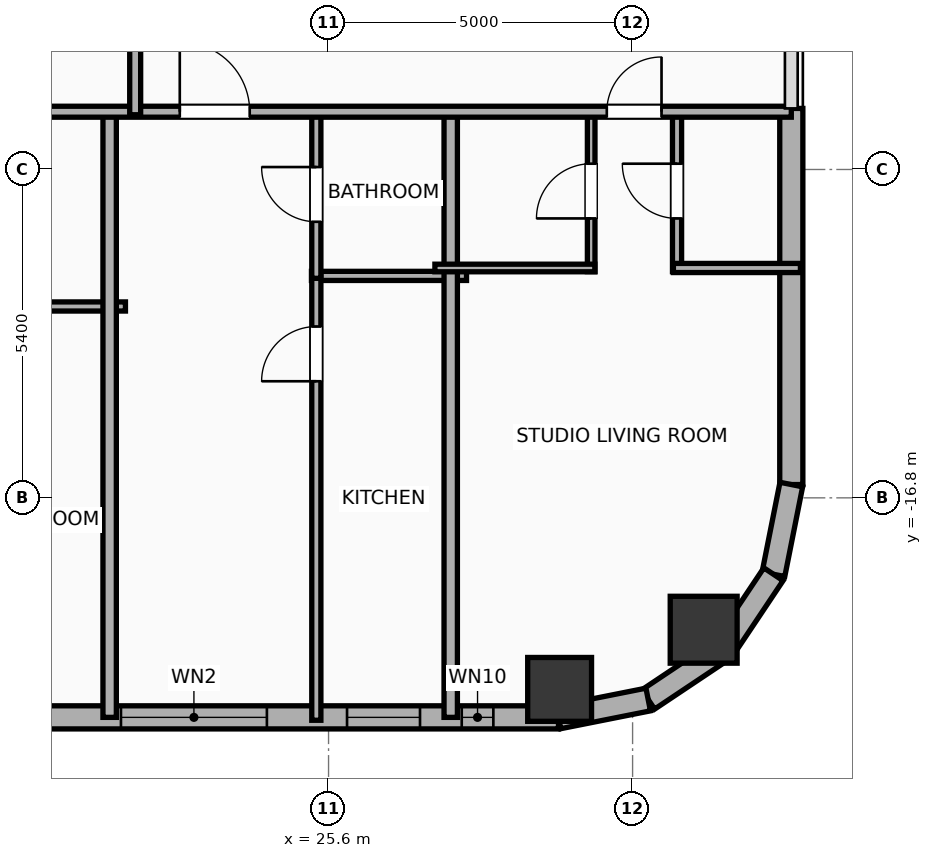
"""IFC4 building model, lengths in metres.
Left out: names, types, materials, properties, quantities, classifications, styles, units other than length and angle.
Written with IfcOpenShell. Run it as: python <this file> out.ifc"""

import sys

from ifc_helpers import new_model, si_unit, direction, frame, frame_2d, origin, origin_2d, place, context, subcontext, project, spatial, rectangle, hollow_rectangle, hollow_circle, extrude, element, fill, save


model = new_model("IFC4")
c1 = context("Model", 3, precision=1e-05, world=origin(), true_north=direction((0.0, 1.0)))
c2 = subcontext(c1, "Body", "Model", "MODEL_VIEW")
j1 = project(units=[si_unit("LENGTHUNIT", "METRE"), si_unit("PLANEANGLEUNIT", "RADIAN")], contexts=[c1])
p1 = place(None, origin())
s1 = spatial("IfcSite", under=j1, at=p1, CompositionType="ELEMENT")
p2 = place(p1, origin())
s2 = spatial("IfcBuilding", under=s1, at=p2, CompositionType="ELEMENT")
p3 = place(p2, frame((0.0, 0.0, 93.6)))
s3 = spatial("IfcBuildingStorey", under=s2, at=p3, CompositionType="ELEMENT", Elevation=93.6)
p4 = place(p3, frame((29.4, -19.95, 0.0), z_axis=(0.0, 0.0, 1.0), x_axis=(1.0, 0.0, 0.0)))
e1 = element("IfcColumn", 1, at=p4, inside=s3, PredefinedType="COLUMN", context=c2, shape_type="SweptSolid", body=[
    extrude(hollow_rectangle(XDim=1.05, YDim=1.05, WallThickness=0.036, at=origin_2d()), origin(), (0.0, 0.0, 1.0), 3.9),
])
p5 = place(p3, frame((31.769, -18.969, 0.0), z_axis=(0.0, 0.0, 1.0), x_axis=(1.0, 0.0, 0.0)))
e2 = element("IfcColumn", 2, at=p5, inside=s3, PredefinedType="COLUMN", context=c2, shape_type="SweptSolid", body=[
    extrude(hollow_circle(Radius=0.55, WallThickness=0.036, at=origin_2d()), origin(), (0.0, 0.0, 1.0), 3.9),
])
p6 = place(p3, frame((29.381, -20.41, 0.0), z_axis=(0.0, 0.0, 1.0), x_axis=(-1.0, 0.0, 0.0)))
e3 = element("IfcWall", 3, at=p6, inside=s3, PredefinedType="ELEMENTEDWALL", context=c2, shape_type="SweptSolid", body=[
    extrude(rectangle(XDim=54.763, YDim=0.38, at=frame_2d((27.381, 0.0))), origin(), (0.0, 0.0, 1.0), 3.65),
])
p7 = place(p6, frame((4.795, 0.0, 0.75)))
e4 = element("IfcOpeningElement", 4, at=p7, cuts=e3, PredefinedType="OPENING", context=c2, shape_type="SweptSolid", body=[
    extrude(rectangle(XDim=2.4, YDim=2.1, at=frame_2d((1.2, 1.05))), frame((0.0, 0.2, 0.0), z_axis=(0.0, -1.0, 0.0), x_axis=(1.0, 0.0, 0.0)), (0.0, 0.0, 1.0), 0.4),
])
p8 = place(p6, frame((33.877, 0.0, 0.75)))
e5 = element("IfcOpeningElement", 5, at=p8, cuts=e3, PredefinedType="OPENING", context=c2, shape_type="SweptSolid", body=[
    extrude(rectangle(XDim=2.4, YDim=2.1, at=frame_2d((1.2, 1.05))), frame((0.0, 0.2, 0.0), z_axis=(0.0, -1.0, 0.0), x_axis=(1.0, 0.0, 0.0)), (0.0, 0.0, 1.0), 0.4),
])
p9 = place(p6, frame((45.867, 0.0, 0.75)))
e6 = element("IfcOpeningElement", 6, at=p9, cuts=e3, PredefinedType="OPENING", context=c2, shape_type="SweptSolid", body=[
    extrude(rectangle(XDim=2.4, YDim=2.1, at=frame_2d((1.2, 1.05))), frame((0.0, 0.2, 0.0), z_axis=(0.0, -1.0, 0.0), x_axis=(1.0, 0.0, 0.0)), (0.0, 0.0, 1.0), 0.4),
])
p10 = place(p6, frame((53.122, 0.0, 0.75)))
e7 = element("IfcOpeningElement", 7, at=p10, cuts=e3, PredefinedType="OPENING", context=c2, shape_type="SweptSolid", body=[
    extrude(rectangle(XDim=0.85, YDim=2.05, at=frame_2d((0.425, 1.025))), frame((0.0, 0.2, 0.0), z_axis=(0.0, -1.0, 0.0), x_axis=(1.0, 0.0, 0.0)), (0.0, 0.0, 1.0), 0.4),
])
p11 = place(p6, frame((50.286, 0.0, 0.75)))
e8 = element("IfcOpeningElement", 8, at=p11, cuts=e3, PredefinedType="OPENING", context=c2, shape_type="SweptSolid", body=[
    extrude(rectangle(XDim=1.2, YDim=2.05, at=frame_2d((0.6, 1.025))), frame((0.0, 0.2, 0.0), z_axis=(0.0, -1.0, 0.0), x_axis=(1.0, 0.0, 0.0)), (0.0, 0.0, 1.0), 0.4),
])
p12 = place(p6, frame((41.846, 0.0, 0.75)))
e9 = element("IfcOpeningElement", 9, at=p12, cuts=e3, PredefinedType="OPENING", context=c2, shape_type="SweptSolid", body=[
    extrude(rectangle(XDim=1.2, YDim=2.05, at=frame_2d((0.6, 1.025))), frame((0.0, 0.2, 0.0), z_axis=(0.0, -1.0, 0.0), x_axis=(1.0, 0.0, 0.0)), (0.0, 0.0, 1.0), 0.4),
])
p13 = place(p6, frame((38.886, 0.0, 0.75)))
e10 = element("IfcOpeningElement", 10, at=p13, cuts=e3, PredefinedType="OPENING", context=c2, shape_type="SweptSolid", body=[
    extrude(rectangle(XDim=1.2, YDim=2.05, at=frame_2d((0.6, 1.025))), frame((0.0, 0.2, 0.0), z_axis=(0.0, -1.0, 0.0), x_axis=(1.0, 0.0, 0.0)), (0.0, 0.0, 1.0), 0.4),
])
p14 = place(p6, frame((30.926, 0.0, 0.75)))
e11 = element("IfcOpeningElement", 11, at=p14, cuts=e3, PredefinedType="OPENING", context=c2, shape_type="SweptSolid", body=[
    extrude(rectangle(XDim=1.2, YDim=2.05, at=frame_2d((0.6, 1.025))), frame((0.0, 0.2, 0.0), z_axis=(0.0, -1.0, 0.0), x_axis=(1.0, 0.0, 0.0)), (0.0, 0.0, 1.0), 0.4),
])
p15 = place(p6, frame((27.486, 0.0, 0.75)))
e12 = element("IfcOpeningElement", 12, at=p15, cuts=e3, PredefinedType="OPENING", context=c2, shape_type="SweptSolid", body=[
    extrude(rectangle(XDim=1.2, YDim=2.05, at=frame_2d((0.6, 1.025))), frame((0.0, 0.2, 0.0), z_axis=(0.0, -1.0, 0.0), x_axis=(1.0, 0.0, 0.0)), (0.0, 0.0, 1.0), 0.4),
])
p16 = place(p6, frame((23.686, 0.0, 0.75)))
e13 = element("IfcOpeningElement", 13, at=p16, cuts=e3, PredefinedType="OPENING", context=c2, shape_type="SweptSolid", body=[
    extrude(rectangle(XDim=1.2, YDim=2.05, at=frame_2d((0.6, 1.025))), frame((0.0, 0.2, 0.0), z_axis=(0.0, -1.0, 0.0), x_axis=(1.0, 0.0, 0.0)), (0.0, 0.0, 1.0), 0.4),
])
p17 = place(p6, frame((19.886, 0.0, 0.75)))
e14 = element("IfcOpeningElement", 14, at=p17, cuts=e3, PredefinedType="OPENING", context=c2, shape_type="SweptSolid", body=[
    extrude(rectangle(XDim=1.2, YDim=2.05, at=frame_2d((0.6, 1.025))), frame((0.0, 0.2, 0.0), z_axis=(0.0, -1.0, 0.0), x_axis=(1.0, 0.0, 0.0)), (0.0, 0.0, 1.0), 0.4),
])
p18 = place(p6, frame((16.086, 0.0, 0.75)))
e15 = element("IfcOpeningElement", 15, at=p18, cuts=e3, PredefinedType="OPENING", context=c2, shape_type="SweptSolid", body=[
    extrude(rectangle(XDim=1.2, YDim=2.05, at=frame_2d((0.6, 1.025))), frame((0.0, 0.2, 0.0), z_axis=(0.0, -1.0, 0.0), x_axis=(1.0, 0.0, 0.0)), (0.0, 0.0, 1.0), 0.4),
])
p19 = place(p6, frame((12.286, 0.0, 0.75)))
e16 = element("IfcOpeningElement", 16, at=p19, cuts=e3, PredefinedType="OPENING", context=c2, shape_type="SweptSolid", body=[
    extrude(rectangle(XDim=1.2, YDim=2.05, at=frame_2d((0.6, 1.025))), frame((0.0, 0.2, 0.0), z_axis=(0.0, -1.0, 0.0), x_axis=(1.0, 0.0, 0.0)), (0.0, 0.0, 1.0), 0.4),
])
p20 = place(p6, frame((8.486, 0.0, 0.75)))
e17 = element("IfcOpeningElement", 17, at=p20, cuts=e3, PredefinedType="OPENING", context=c2, shape_type="SweptSolid", body=[
    extrude(rectangle(XDim=1.2, YDim=2.05, at=frame_2d((0.6, 1.025))), frame((0.0, 0.2, 0.0), z_axis=(0.0, -1.0, 0.0), x_axis=(1.0, 0.0, 0.0)), (0.0, 0.0, 1.0), 0.4),
])
p21 = place(p6, frame((2.277, 0.0, 0.75)))
e18 = element("IfcOpeningElement", 18, at=p21, cuts=e3, PredefinedType="OPENING", context=c2, shape_type="SweptSolid", body=[
    extrude(rectangle(XDim=1.2, YDim=2.05, at=frame_2d((0.6, 1.025))), frame((0.0, 0.2, 0.0), z_axis=(0.0, -1.0, 0.0), x_axis=(1.0, 0.0, 0.0)), (0.0, 0.0, 1.0), 0.4),
])
p22 = place(p6, frame((1.071, 0.0, 0.75)))
e19 = element("IfcOpeningElement", 19, at=p22, cuts=e3, PredefinedType="OPENING", context=c2, shape_type="SweptSolid", body=[
    extrude(rectangle(XDim=0.52, YDim=2.05, at=frame_2d((0.26, 1.025))), frame((0.0, 0.2, 0.0), z_axis=(0.0, -1.0, 0.0), x_axis=(1.0, 0.0, 0.0)), (0.0, 0.0, 1.0), 0.4),
])
p23 = place(p3, frame((33.21, -10.396, 0.0), z_axis=(0.0, 0.0, 1.0), x_axis=(0.0, -1.0, 0.0)))
e20 = element("IfcWall", 20, at=p23, inside=s3, PredefinedType="ELEMENTEDWALL", context=c2, shape_type="SweptSolid", body=[
    extrude(rectangle(XDim=6.185, YDim=0.38, at=frame_2d((3.093, 0.0))), origin(), (0.0, 0.0, 1.0), 3.65),
])
p24 = place(p3, frame((33.21, -16.581, 0.0), z_axis=(0.0, 0.0, 1.0), x_axis=(-0.195086038585, -0.980786132421, 0.0)))
e21 = element("IfcWall", 21, at=p24, inside=s3, PredefinedType="ELEMENTEDWALL", context=c2, shape_type="SweptSolid", body=[
    extrude(rectangle(XDim=1.504, YDim=0.38, at=frame_2d((0.752, 0.0))), origin(), (0.0, 0.0, 1.0), 3.65),
])
p25 = place(p3, frame((32.917, -18.057, 0.0), z_axis=(0.0, 0.0, 1.0), x_axis=(-0.555610286119, -0.831442848281, 0.0)))
e22 = element("IfcWall", 22, at=p25, inside=s3, PredefinedType="ELEMENTEDWALL", context=c2, shape_type="SweptSolid", body=[
    extrude(rectangle(XDim=1.485, YDim=0.38, at=frame_2d((0.743, 0.0))), origin(), (0.0, 0.0, 1.0), 3.65),
])
p26 = place(p3, frame((32.091, -19.292, 0.0), z_axis=(0.0, 0.0, 1.0), x_axis=(-0.831468045563, -0.555572577804, 0.0)))
e23 = element("IfcWall", 23, at=p26, inside=s3, PredefinedType="ELEMENTEDWALL", context=c2, shape_type="SweptSolid", body=[
    extrude(rectangle(XDim=1.485, YDim=0.38, at=frame_2d((0.742, 0.0))), origin(), (0.0, 0.0, 1.0), 3.65),
])
p27 = place(p3, frame((30.857, -20.116, 0.0), z_axis=(0.0, 0.0, 1.0), x_axis=(-0.980786132421, -0.195086038585, 0.0)))
e24 = element("IfcWall", 24, at=p27, inside=s3, PredefinedType="ELEMENTEDWALL", context=c2, shape_type="SweptSolid", body=[
    extrude(rectangle(XDim=1.504, YDim=0.38, at=frame_2d((0.752, 0.0))), origin(), (0.0, 0.0, 1.0), 3.65),
])
p28 = place(p3, frame((18.47, -13.653, 0.0), z_axis=(0.0, 0.0, 1.0), x_axis=(1.0, 0.0, 0.0)))
e25 = element("IfcWall", 25, at=p28, inside=s3, PredefinedType="PLUMBINGWALL", context=c2, shape_type="SweptSolid", body=[
    extrude(rectangle(XDim=3.79, YDim=0.15, at=frame_2d((1.895, 0.0))), origin(), (0.0, 0.0, 1.0), 3.65),
])
p29 = place(p3, frame((22.0, -20.41, 0.0), z_axis=(0.0, 0.0, 1.0), x_axis=(0.0, 1.0, 0.0)))
e26 = element("IfcWall", 26, at=p29, inside=s3, PredefinedType="PARTITIONING", context=c2, shape_type="SweptSolid", body=[
    extrude(rectangle(XDim=10.04, YDim=0.22, at=frame_2d((5.02, 0.0))), origin(), (0.0, 0.0, 1.0), 3.65),
])
p30 = place(p3, frame((25.319, -13.15, 0.0), z_axis=(0.0, 0.0, 1.0), x_axis=(1.0, 0.0, 0.0)))
e27 = element("IfcWall", 27, at=p30, inside=s3, PredefinedType="PLUMBINGWALL", context=c2, shape_type="SweptSolid", body=[
    extrude(rectangle(XDim=2.55, YDim=0.15, at=frame_2d((1.275, 0.0))), origin(), (0.0, 0.0, 1.0), 3.65),
])
p31 = place(p3, frame((25.399, -20.458, 0.0), z_axis=(0.0, 0.0, 1.0), x_axis=(0.0, 1.0, 0.0)))
e28 = element("IfcWall", 28, at=p31, inside=s3, PredefinedType="PLUMBINGWALL", context=c2, shape_type="SweptSolid", body=[
    extrude(rectangle(XDim=7.347, YDim=0.15, at=frame_2d((3.674, 0.0))), origin(), (0.0, 0.0, 1.0), 3.65),
])
p32 = place(p31, frame((5.575, 0.0, 0.0)))
e29 = element("IfcOpeningElement", 29, at=p32, cuts=e28, PredefinedType="OPENING", context=c2, shape_type="SweptSolid", body=[
    extrude(rectangle(XDim=0.9, YDim=2.05, at=frame_2d((0.45, 1.025))), frame((0.0, 0.085, 0.0), z_axis=(0.0, -1.0, 0.0), x_axis=(1.0, 0.0, 0.0)), (0.0, 0.0, 1.0), 0.17),
])
p33 = place(p3, frame((25.399, -13.19, 0.0), z_axis=(0.0, 0.0, 1.0), x_axis=(0.0, 1.0, 0.0)))
e30 = element("IfcWall", 30, at=p33, inside=s3, PredefinedType="PLUMBINGWALL", context=c2, shape_type="SweptSolid", body=[
    extrude(rectangle(XDim=2.76, YDim=0.15, at=frame_2d((1.38, 0.0))), origin(), (0.0, 0.0, 1.0), 3.65),
])
p34 = place(p33, frame((0.93, 0.0, 0.0)))
e31 = element("IfcOpeningElement", 31, at=p34, cuts=e30, PredefinedType="OPENING", context=c2, shape_type="SweptSolid", body=[
    extrude(rectangle(XDim=0.9, YDim=2.05, at=frame_2d((0.45, 1.025))), frame((0.0, 0.085, 0.0), z_axis=(0.0, -1.0, 0.0), x_axis=(1.0, 0.0, 0.0)), (0.0, 0.0, 1.0), 0.17),
])
p35 = place(p3, frame((27.609, -20.41, 0.0), z_axis=(0.0, 0.0, 1.0), x_axis=(0.0, 1.0, 0.0)))
e32 = element("IfcWall", 32, at=p35, inside=s3, PredefinedType="PARTITIONING", context=c2, shape_type="SweptSolid", body=[
    extrude(rectangle(XDim=10.04, YDim=0.22, at=frame_2d((5.02, 0.0))), origin(), (0.0, 0.0, 1.0), 3.65),
])
p36 = place(p3, frame((29.919, -13.08, 0.0), z_axis=(0.0, 0.0, 1.0), x_axis=(0.0, 1.0, 0.0)))
e33 = element("IfcWall", 33, at=p36, inside=s3, PredefinedType="PARTITIONING", context=c2, shape_type="SweptSolid", body=[
    extrude(rectangle(XDim=2.65, YDim=0.125, at=frame_2d((1.325, 0.0))), origin(), (0.0, 0.0, 1.0), 3.65),
])
p37 = place(p36, frame((0.875, 0.0, 0.0)))
e34 = element("IfcOpeningElement", 34, at=p37, cuts=e33, PredefinedType="OPENING", context=c2, shape_type="SweptSolid", body=[
    extrude(rectangle(XDim=0.9, YDim=2.05, at=frame_2d((0.45, 1.025))), frame((0.0, 0.073, 0.0), z_axis=(0.0, -1.0, 0.0), x_axis=(1.0, 0.0, 0.0)), (0.0, 0.0, 1.0), 0.145),
])
p38 = place(p3, frame((31.331, -13.08, 0.0), z_axis=(0.0, 0.0, 1.0), x_axis=(0.0, 1.0, 0.0)))
e35 = element("IfcWall", 35, at=p38, inside=s3, PredefinedType="PLUMBINGWALL", context=c2, shape_type="SweptSolid", body=[
    extrude(rectangle(XDim=2.65, YDim=0.15, at=frame_2d((1.325, 0.0))), origin(), (0.0, 0.0, 1.0), 3.65),
])
p39 = place(p38, frame((0.875, 0.0, 0.0)))
e36 = element("IfcOpeningElement", 36, at=p39, cuts=e35, PredefinedType="OPENING", context=c2, shape_type="SweptSolid", body=[
    extrude(rectangle(XDim=0.9, YDim=2.05, at=frame_2d((0.45, 1.025))), frame((0.0, 0.085, 0.0), z_axis=(0.0, -1.0, 0.0), x_axis=(1.0, 0.0, 0.0)), (0.0, 0.0, 1.0), 0.17),
])
p40 = place(p3, frame((27.349, -13.02, 0.0), z_axis=(0.0, 0.0, 1.0), x_axis=(1.0, 0.0, 0.0)))
e37 = element("IfcWall", 37, at=p40, inside=s3, PredefinedType="PARTITIONING", context=c2, shape_type="SweptSolid", body=[
    extrude(rectangle(XDim=2.63, YDim=0.125, at=frame_2d((1.315, 0.0))), origin(), (0.0, 0.0, 1.0), 3.65),
])
p41 = place(p3, frame((31.271, -13.02, 0.0), z_axis=(0.0, 0.0, 1.0), x_axis=(1.0, 0.0, 0.0)))
e38 = element("IfcWall", 38, at=p41, inside=s3, PredefinedType="PLUMBINGWALL", context=c2, shape_type="SweptSolid", body=[
    extrude(rectangle(XDim=2.089, YDim=0.15, at=frame_2d((1.044, 0.0))), origin(), (0.0, 0.0, 1.0), 3.65),
])
p42 = place(p3, frame((-29.21, -10.45, 0.0), z_axis=(0.0, 0.0, 1.0), x_axis=(1.0, 0.0, 0.0)))
e39 = element("IfcWall", 39, at=p42, inside=s3, PredefinedType="PARTITIONING", context=c2, shape_type="SweptSolid", body=[
    extrude(rectangle(XDim=62.42, YDim=0.18, at=frame_2d((31.21, 0.0))), origin(), (0.0, 0.0, 1.0), 3.65),
])
p43 = place(p42, frame((2.502, 0.0, 0.0)))
e40 = element("IfcOpeningElement", 40, at=p43, cuts=e39, PredefinedType="OPENING", context=c2, shape_type="SweptSolid", body=[
    extrude(rectangle(XDim=0.9, YDim=2.05, at=frame_2d((0.45, 1.025))), frame((0.0, 0.1, 0.0), z_axis=(0.0, -1.0, 0.0), x_axis=(1.0, 0.0, 0.0)), (0.0, 0.0, 1.0), 0.2),
])
p44 = place(p42, frame((9.0, 0.0, 0.0)))
e41 = element("IfcOpeningElement", 41, at=p44, cuts=e39, PredefinedType="OPENING", context=c2, shape_type="SweptSolid", body=[
    extrude(rectangle(XDim=1.15, YDim=2.05, at=frame_2d((0.575, 1.025))), frame((0.0, 0.1, 0.0), z_axis=(0.0, -1.0, 0.0), x_axis=(1.0, 0.0, 0.0)), (0.0, 0.0, 1.0), 0.2),
])
p45 = place(p42, frame((16.603, 0.0, 0.0)))
e42 = element("IfcOpeningElement", 42, at=p45, cuts=e39, PredefinedType="OPENING", context=c2, shape_type="SweptSolid", body=[
    extrude(rectangle(XDim=1.15, YDim=2.05, at=frame_2d((0.575, 1.025))), frame((0.0, 0.1, 0.0), z_axis=(0.0, -1.0, 0.0), x_axis=(1.0, 0.0, 0.0)), (0.0, 0.0, 1.0), 0.2),
])
p46 = place(p42, frame((24.199, 0.0, 0.0)))
e43 = element("IfcOpeningElement", 43, at=p46, cuts=e39, PredefinedType="OPENING", context=c2, shape_type="SweptSolid", body=[
    extrude(rectangle(XDim=1.15, YDim=2.05, at=frame_2d((0.575, 1.025))), frame((0.0, 0.1, 0.0), z_axis=(0.0, -1.0, 0.0), x_axis=(1.0, 0.0, 0.0)), (0.0, 0.0, 1.0), 0.2),
])
p47 = place(p42, frame((31.802, 0.0, 0.0)))
e44 = element("IfcOpeningElement", 44, at=p47, cuts=e39, PredefinedType="OPENING", context=c2, shape_type="SweptSolid", body=[
    extrude(rectangle(XDim=1.15, YDim=2.05, at=frame_2d((0.575, 1.025))), frame((0.0, 0.1, 0.0), z_axis=(0.0, -1.0, 0.0), x_axis=(1.0, 0.0, 0.0)), (0.0, 0.0, 1.0), 0.2),
])
p48 = place(p42, frame((39.399, 0.0, 0.0)))
e45 = element("IfcOpeningElement", 45, at=p48, cuts=e39, PredefinedType="OPENING", context=c2, shape_type="SweptSolid", body=[
    extrude(rectangle(XDim=1.15, YDim=2.05, at=frame_2d((0.575, 1.025))), frame((0.0, 0.1, 0.0), z_axis=(0.0, -1.0, 0.0), x_axis=(1.0, 0.0, 0.0)), (0.0, 0.0, 1.0), 0.2),
])
p49 = place(p42, frame((47.001, 0.0, 0.0)))
e46 = element("IfcOpeningElement", 46, at=p49, cuts=e39, PredefinedType="OPENING", context=c2, shape_type="SweptSolid", body=[
    extrude(rectangle(XDim=1.15, YDim=2.05, at=frame_2d((0.575, 1.025))), frame((0.0, 0.1, 0.0), z_axis=(0.0, -1.0, 0.0), x_axis=(1.0, 0.0, 0.0)), (0.0, 0.0, 1.0), 0.2),
])
p50 = place(p42, frame((52.363, 0.0, 0.0)))
e47 = element("IfcOpeningElement", 47, at=p50, cuts=e39, PredefinedType="OPENING", context=c2, shape_type="SweptSolid", body=[
    extrude(rectangle(XDim=1.15, YDim=2.05, at=frame_2d((0.575, 1.025))), frame((0.0, 0.1, 0.0), z_axis=(0.0, -1.0, 0.0), x_axis=(1.0, 0.0, 0.0)), (0.0, 0.0, 1.0), 0.2),
])
p51 = place(p42, frame((59.386, 0.0, 0.0)))
e48 = element("IfcOpeningElement", 48, at=p51, cuts=e39, PredefinedType="OPENING", context=c2, shape_type="SweptSolid", body=[
    extrude(rectangle(XDim=0.9, YDim=2.05, at=frame_2d((0.45, 1.025))), frame((0.0, 0.1, 0.0), z_axis=(0.0, -1.0, 0.0), x_axis=(1.0, 0.0, 0.0)), (0.0, 0.0, 1.0), 0.2),
])
p52 = place(p3, frame((22.42, -10.5, 0.0), z_axis=(0.0, 0.0, 1.0), x_axis=(0.0, 1.0, 0.0)))
e49 = element("IfcWall", 49, at=p52, inside=s3, PredefinedType="PARTITIONING", context=c2, shape_type="SweptSolid", body=[
    extrude(rectangle(XDim=21.0, YDim=0.18, at=frame_2d((10.5, 0.0))), origin(), (0.0, 0.0, 1.0), 3.65),
])
p53 = place(p52, frame((18.205, 0.0, 0.0)))
e50 = element("IfcOpeningElement", 50, at=p53, cuts=e49, PredefinedType="OPENING", context=c2, shape_type="SweptSolid", body=[
    extrude(rectangle(XDim=0.95, YDim=2.05, at=frame_2d((0.475, 1.025))), frame((0.0, 0.1, 0.0), z_axis=(0.0, -1.0, 0.0), x_axis=(1.0, 0.0, 0.0)), (0.0, 0.0, 1.0), 0.2),
])
p54 = place(p7, origin())
e51 = element("IfcWindow", 51, at=p54, inside=s3, PartitioningType="SINGLE_PANEL", PredefinedType="WINDOW", context=c2, shape_type="SweptSolid", body=[
    extrude(rectangle(XDim=2.4, YDim=2.1, at=frame_2d((1.2, 1.05))), frame((0.0, 0.03, 0.0), z_axis=(0.0, -1.0, 0.0), x_axis=(1.0, 0.0, 0.0)), (0.0, 0.0, 1.0), 0.06),
])
fill(e4, e51)
p55 = place(p21, origin())
e52 = element("IfcWindow", 52, at=p55, inside=s3, PartitioningType="SINGLE_PANEL", PredefinedType="WINDOW", context=c2, shape_type="SweptSolid", body=[
    extrude(rectangle(XDim=1.2, YDim=2.05, at=frame_2d((0.6, 1.025))), frame((0.0, 0.03, 0.0), z_axis=(0.0, -1.0, 0.0), x_axis=(1.0, 0.0, 0.0)), (0.0, 0.0, 1.0), 0.06),
])
fill(e18, e52)
p56 = place(p22, origin())
e53 = element("IfcWindow", 53, at=p56, inside=s3, PartitioningType="SINGLE_PANEL", PredefinedType="WINDOW", context=c2, shape_type="SweptSolid", body=[
    extrude(rectangle(XDim=0.52, YDim=2.05, at=frame_2d((0.26, 1.025))), frame((0.0, 0.03, 0.0), z_axis=(0.0, -1.0, 0.0), x_axis=(1.0, 0.0, 0.0)), (0.0, 0.0, 1.0), 0.06),
])
fill(e19, e53)
p57 = place(p32, origin())
e54 = element("IfcDoor", 54, at=p57, inside=s3, OperationType="SINGLE_SWING_LEFT", PredefinedType="DOOR", context=c2, shape_type="SweptSolid", body=[
    extrude(rectangle(XDim=0.9, YDim=2.05, at=frame_2d((0.45, 1.025))), frame((0.0, 0.025, 0.0), z_axis=(0.0, -1.0, 0.0), x_axis=(1.0, 0.0, 0.0)), (0.0, 0.0, 1.0), 0.05),
])
fill(e29, e54)
p58 = place(p34, origin())
e55 = element("IfcDoor", 55, at=p58, inside=s3, OperationType="SINGLE_SWING_RIGHT", PredefinedType="DOOR", context=c2, shape_type="SweptSolid", body=[
    extrude(rectangle(XDim=0.9, YDim=2.05, at=frame_2d((0.45, 1.025))), frame((0.0, 0.025, 0.0), z_axis=(0.0, -1.0, 0.0), x_axis=(1.0, 0.0, 0.0)), (0.0, 0.0, 1.0), 0.05),
])
fill(e31, e55)
p59 = place(p37, origin())
e56 = element("IfcDoor", 56, at=p59, inside=s3, OperationType="SINGLE_SWING_LEFT", PredefinedType="DOOR", context=c2, shape_type="SweptSolid", body=[
    extrude(rectangle(XDim=0.9, YDim=2.05, at=frame_2d((0.45, 1.025))), frame((0.0, 0.025, 0.0), z_axis=(0.0, -1.0, 0.0), x_axis=(1.0, 0.0, 0.0)), (0.0, 0.0, 1.0), 0.05),
])
fill(e34, e56)
p60 = place(p39, origin())
e57 = element("IfcDoor", 57, at=p60, inside=s3, OperationType="SINGLE_SWING_RIGHT", PredefinedType="DOOR", context=c2, shape_type="SweptSolid", body=[
    extrude(rectangle(XDim=0.9, YDim=2.05, at=frame_2d((0.45, 1.025))), frame((0.0, 0.025, 0.0), z_axis=(0.0, -1.0, 0.0), x_axis=(1.0, 0.0, 0.0)), (0.0, 0.0, 1.0), 0.05),
])
fill(e36, e57)
p61 = place(p50, origin())
e58 = element("IfcDoor", 58, at=p61, inside=s3, OperationType="SINGLE_SWING_LEFT", PredefinedType="DOOR", context=c2, shape_type="SweptSolid", body=[
    extrude(rectangle(XDim=1.15, YDim=2.05, at=frame_2d((0.575, 1.025))), frame((0.0, 0.025, 0.0), z_axis=(0.0, -1.0, 0.0), x_axis=(1.0, 0.0, 0.0)), (0.0, 0.0, 1.0), 0.05),
])
fill(e47, e58)
p62 = place(p51, origin())
e59 = element("IfcDoor", 59, at=p62, inside=s3, OperationType="SINGLE_SWING_RIGHT", PredefinedType="DOOR", context=c2, shape_type="SweptSolid", body=[
    extrude(rectangle(XDim=0.9, YDim=2.05, at=frame_2d((0.45, 1.025))), frame((0.0, 0.025, 0.0), z_axis=(0.0, -1.0, 0.0), x_axis=(1.0, 0.0, 0.0)), (0.0, 0.0, 1.0), 0.05),
])
fill(e48, e59)
save(model, sys.argv[1])
